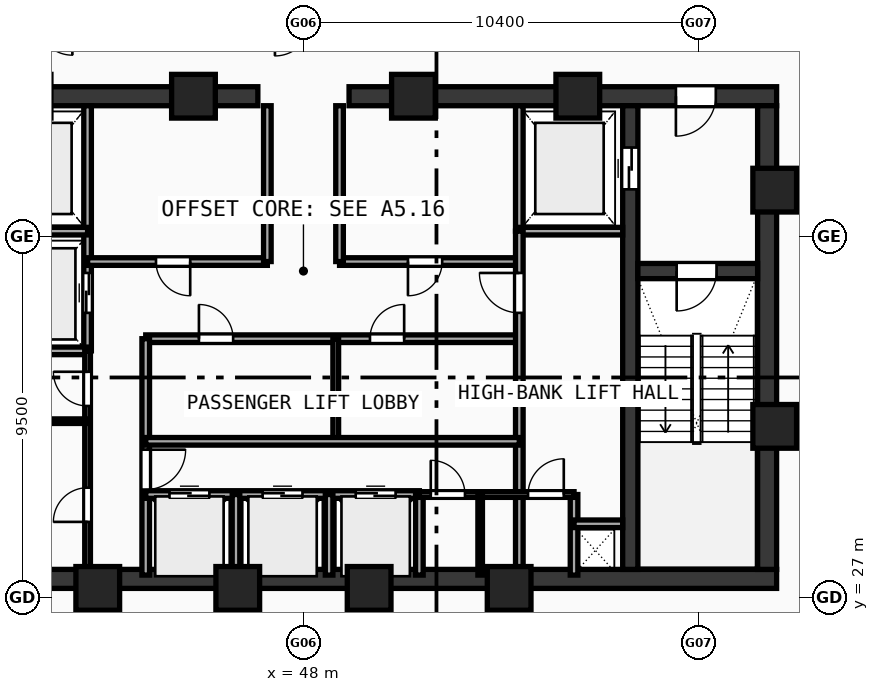
"""IFC4 building model, lengths in metres.
Left out: names, types, materials, properties, quantities, classifications, styles, units other than length and angle.
Written with IfcOpenShell. Run it as: python <this file> out.ifc"""

import sys

from ifc_helpers import new_model, si_unit, direction, frame, frame_2d, origin, origin_with_axes, origin_2d, place, context, subcontext, project, spatial, rectangle, hollow_rectangle, extrude, source, transform, mapped, element, fill, save


model = new_model("IFC4")
c1 = context("Model", 3, precision=1e-05, world=origin(), true_north=direction((0.0, 1.0)))
c2 = subcontext(c1, "Body", "Model", "MODEL_VIEW")
j1 = project(units=[si_unit("LENGTHUNIT", "METRE"), si_unit("PLANEANGLEUNIT", "RADIAN")], contexts=[c1])
p1 = place(None, origin())
s1 = spatial("IfcSite", under=j1, at=p1, CompositionType="ELEMENT")
p2 = place(p1, origin())
s2 = spatial("IfcBuilding", under=s1, at=p2, CompositionType="ELEMENT")
p3 = place(p2, frame((0.0, 0.0, 244.53)))
s3 = spatial("IfcBuildingStorey", under=s2, at=p3, CompositionType="ELEMENT", Elevation=244.53)
p4 = place(p3, frame((35.55, 27.5, 0.0), z_axis=(0.0, 0.0, 1.0), x_axis=(1.0, 0.0, 0.0)))
e1 = element("IfcWall", 1, at=p4, inside=s3, PredefinedType="SHEAR", context=c2, shape_type="SweptSolid", body=[
    extrude(rectangle(XDim=24.9, YDim=0.5, at=frame_2d((12.45, 0.0))), origin(), (0.0, 0.0, 1.0), 3.47),
])
p5 = place(p3, frame((35.55, 40.2, 0.0), z_axis=(0.0, 0.0, 1.0), x_axis=(1.0, 0.0, 0.0)))
e2 = element("IfcWall", 2, at=p5, inside=s3, PredefinedType="SHEAR", context=c2, shape_type="SweptSolid", body=[
    extrude(rectangle(XDim=11.25, YDim=0.5, at=frame_2d((5.625, 0.0))), origin(), (0.0, 0.0, 1.0), 3.47),
])
p6 = place(p5, frame((1.6, 0.0, 0.0)))
e3 = element("IfcOpeningElement", 3, at=p6, cuts=e2, PredefinedType="OPENING", context=c2, shape_type="SweptSolid", body=[
    extrude(rectangle(XDim=1.05, YDim=2.1, at=frame_2d((0.525, 1.05))), frame((0.0, 0.26, 0.0), z_axis=(0.0, -1.0, 0.0), x_axis=(1.0, 0.0, 0.0)), (0.0, 0.0, 1.0), 0.52),
])
p7 = place(p3, frame((49.2, 40.2, 0.0), z_axis=(0.0, 0.0, 1.0), x_axis=(1.0, 0.0, 0.0)))
e4 = element("IfcWall", 4, at=p7, inside=s3, PredefinedType="SHEAR", context=c2, shape_type="SweptSolid", body=[
    extrude(rectangle(XDim=11.25, YDim=0.5, at=frame_2d((5.625, 0.0))), origin(), (0.0, 0.0, 1.0), 3.47),
])
p8 = place(p7, frame((8.6, 0.0, 0.0)))
e5 = element("IfcOpeningElement", 5, at=p8, cuts=e4, PredefinedType="OPENING", context=c2, shape_type="SweptSolid", body=[
    extrude(rectangle(XDim=1.05, YDim=2.1, at=frame_2d((0.525, 1.05))), frame((0.0, 0.26, 0.0), z_axis=(0.0, -1.0, 0.0), x_axis=(1.0, 0.0, 0.0)), (0.0, 0.0, 1.0), 0.52),
])
p9 = place(p3, frame((60.2, 27.75, 0.0), z_axis=(0.0, 0.0, 1.0), x_axis=(0.0, 1.0, 0.0)))
e6 = element("IfcWall", 6, at=p9, inside=s3, PredefinedType="SHEAR", context=c2, shape_type="SweptSolid", body=[
    extrude(rectangle(XDim=12.2, YDim=0.5, at=frame_2d((6.1, 0.0))), origin(), (0.0, 0.0, 1.0), 3.47),
])
p10 = place(p3, frame((56.6, 27.75, 0.0), z_axis=(0.0, 0.0, 1.0), x_axis=(0.0, 1.0, 0.0)))
e7 = element("IfcWall", 7, at=p10, inside=s3, PredefinedType="SHEAR", context=c2, shape_type="SweptSolid", body=[
    extrude(rectangle(XDim=12.2, YDim=0.4, at=frame_2d((6.1, 0.0))), origin(), (0.0, 0.0, 1.0), 3.47),
])
p11 = place(p10, frame((10.0, 0.0, 0.0)))
e8 = element("IfcOpeningElement", 8, at=p11, cuts=e7, PredefinedType="OPENING", context=c2, shape_type="SweptSolid", body=[
    extrude(rectangle(XDim=1.1, YDim=2.1, at=frame_2d((0.55, 1.05))), frame((0.0, 0.21, 0.0), z_axis=(0.0, -1.0, 0.0), x_axis=(1.0, 0.0, 0.0)), (0.0, 0.0, 1.0), 0.42),
])
p12 = place(p3, frame((56.8, 35.6, 0.0), z_axis=(0.0, 0.0, 1.0), x_axis=(1.0, 0.0, 0.0)))
e9 = element("IfcWall", 9, at=p12, inside=s3, PredefinedType="SHEAR", context=c2, shape_type="SweptSolid", body=[
    extrude(rectangle(XDim=3.15, YDim=0.4, at=frame_2d((1.575, 0.0))), origin(), (0.0, 0.0, 1.0), 3.47),
])
p13 = place(p12, frame((1.02, 0.0, 0.0)))
e10 = element("IfcOpeningElement", 10, at=p13, cuts=e9, PredefinedType="OPENING", context=c2, shape_type="SweptSolid", body=[
    extrude(rectangle(XDim=1.05, YDim=2.1, at=frame_2d((0.525, 1.05))), frame((0.0, 0.21, 0.0), z_axis=(0.0, -1.0, 0.0), x_axis=(1.0, 0.0, 0.0)), (0.0, 0.0, 1.0), 0.42),
])
m1 = source(origin(), c2, "Body", "SweptSolid", [
    extrude(hollow_rectangle(XDim=1.15, YDim=1.15, WallThickness=0.048, at=origin_2d()), origin(), (0.0, 0.0, 1.0), 3.73),
])
for number, where, z_axis, x_axis in (
    (11, (42.588, 27.25, -0.26), (0.0, 0.0, 1.0), (1.0, 0.0, 0.0)),
    (12, (46.272, 27.25, -0.26), (0.0, 0.0, 1.0), (1.0, 0.0, 0.0)),
    (13, (49.729, 27.25, -0.26), (0.0, 0.0, 1.0), (1.0, 0.0, 0.0)),
    (14, (53.412, 27.25, -0.26), (0.0, 0.0, 1.0), (1.0, 0.0, 0.0)),
    (15, (60.4, 31.513, -0.26), (0.0, 0.0, 1.0), (1.0, 0.0, 0.0)),
    (16, (60.4, 37.729, -0.26), (0.0, 0.0, 1.0), (1.0, 0.0, 0.0)),
    (17, (55.219, 40.2, -0.26), (0.0, 0.0, 1.0), (1.0, 0.0, 0.0)),
    (18, (50.894, 40.2, -0.26), (0.0, 0.0, 1.0), (1.0, 0.0, 0.0)),
    (19, (45.106, 40.2, -0.26), (0.0, 0.0, 1.0), (1.0, 0.0, 0.0)),
):
    element("IfcColumn", number, at=place(p3, frame(where, z_axis=z_axis, x_axis=x_axis)), inside=s3, PredefinedType="COLUMN", context=c2, shape_type="MappedRepresentation", body=[
        mapped(m1, transform((0.0, 0.0, 0.0), scale=1.0)),
    ])
p14 = place(p3, frame((42.32, 33.5, 0.0), z_axis=(0.0, 0.0, 1.0), x_axis=(0.0, 1.0, 0.0)))
e20 = element("IfcWall", 20, at=p14, inside=s3, PredefinedType="SOLIDWALL", context=c2, shape_type="SweptSolid", body=[
    extrude(rectangle(XDim=6.45, YDim=0.2, at=frame_2d((3.225, 0.0))), origin(), (0.0, 0.0, 1.0), 3.47),
])
p15 = place(p14, frame((1.0, 0.0, 0.0)))
e21 = element("IfcOpeningElement", 21, at=p15, cuts=e20, PredefinedType="OPENING", context=c2, shape_type="SweptSolid", body=[
    extrude(rectangle(XDim=1.05, YDim=2.1, at=frame_2d((0.525, 1.05))), frame((0.0, 0.11, 0.0), z_axis=(0.0, -1.0, 0.0), x_axis=(1.0, 0.0, 0.0)), (0.0, 0.0, 1.0), 0.22),
])
for number, where, z_axis, x_axis in (
    (22, (39.6, 36.65, 0.0), (0.0, 0.0, 1.0), (1.0, 0.0, 0.0)),
    (23, (39.6, 33.5, 0.0), (0.0, 0.0, 1.0), (1.0, 0.0, 0.0)),
):
    element("IfcWall", number, at=place(p3, frame(where, z_axis=z_axis, x_axis=x_axis)), inside=s3, PredefinedType="SOLIDWALL", context=c2, shape_type="SweptSolid", body=[
        extrude(rectangle(XDim=2.72, YDim=0.2, at=frame_2d((1.36, 0.0))), origin(), (0.0, 0.0, 1.0), 3.47),
    ])
p16 = place(p3, frame((53.68, 36.65, 0.0), z_axis=(0.0, 0.0, 1.0), x_axis=(0.0, 1.0, 0.0)))
e24 = element("IfcWall", 24, at=p16, inside=s3, PredefinedType="SOLIDWALL", context=c2, shape_type="SweptSolid", body=[
    extrude(rectangle(XDim=3.3, YDim=0.2, at=frame_2d((1.65, 0.0))), origin(), (0.0, 0.0, 1.0), 3.47),
])
p17 = place(p3, frame((53.68, 36.65, 0.0), z_axis=(0.0, 0.0, 1.0), x_axis=(1.0, 0.0, 0.0)))
e25 = element("IfcWall", 25, at=p17, inside=s3, PredefinedType="SOLIDWALL", context=c2, shape_type="SweptSolid", body=[
    extrude(rectangle(XDim=2.72, YDim=0.2, at=frame_2d((1.36, 0.0))), origin(), (0.0, 0.0, 1.0), 3.47),
])
p18 = place(p3, frame((42.32, 35.85, 0.0), z_axis=(0.0, 0.0, 1.0), x_axis=(1.0, 0.0, 0.0)))
e26 = element("IfcWall", 26, at=p18, inside=s3, PredefinedType="SOLIDWALL", context=c2, shape_type="SweptSolid", body=[
    extrude(rectangle(XDim=4.73, YDim=0.2, at=frame_2d((2.365, 0.0))), origin(), (0.0, 0.0, 1.0), 3.47),
])
p19 = place(p18, frame((1.8, 0.0, 0.0)))
e27 = element("IfcOpeningElement", 27, at=p19, cuts=e26, PredefinedType="OPENING", context=c2, shape_type="SweptSolid", body=[
    extrude(rectangle(XDim=0.9, YDim=2.1, at=frame_2d((0.45, 1.05))), frame((0.0, 0.11, 0.0), z_axis=(0.0, -1.0, 0.0), x_axis=(1.0, 0.0, 0.0)), (0.0, 0.0, 1.0), 0.22),
])
p20 = place(p3, frame((48.95, 35.85, 0.0), z_axis=(0.0, 0.0, 1.0), x_axis=(1.0, 0.0, 0.0)))
e28 = element("IfcWall", 28, at=p20, inside=s3, PredefinedType="SOLIDWALL", context=c2, shape_type="SweptSolid", body=[
    extrude(rectangle(XDim=4.73, YDim=0.2, at=frame_2d((2.365, 0.0))), origin(), (0.0, 0.0, 1.0), 3.47),
])
p21 = place(p20, frame((1.8, 0.0, 0.0)))
e29 = element("IfcOpeningElement", 29, at=p21, cuts=e28, PredefinedType="OPENING", context=c2, shape_type="SweptSolid", body=[
    extrude(rectangle(XDim=0.9, YDim=2.1, at=frame_2d((0.45, 1.05))), frame((0.0, 0.11, 0.0), z_axis=(0.0, -1.0, 0.0), x_axis=(1.0, 0.0, 0.0)), (0.0, 0.0, 1.0), 0.22),
])
for number, where, z_axis, x_axis in (
    (30, (47.05, 35.85, 0.0), (0.0, 0.0, 1.0), (0.0, 1.0, 0.0)),
    (31, (48.95, 35.85, 0.0), (0.0, 0.0, 1.0), (0.0, 1.0, 0.0)),
):
    element("IfcWall", number, at=place(p3, frame(where, z_axis=z_axis, x_axis=x_axis)), inside=s3, PredefinedType="SOLIDWALL", context=c2, shape_type="SweptSolid", body=[
        extrude(rectangle(XDim=4.1, YDim=0.2, at=frame_2d((2.05, 0.0))), origin(), (0.0, 0.0, 1.0), 3.47),
    ])
p22 = place(p3, frame((43.85, 33.82, 0.0), z_axis=(0.0, 0.0, 1.0), x_axis=(1.0, 0.0, 0.0)))
e32 = element("IfcWall", 32, at=p22, inside=s3, PredefinedType="SOLIDWALL", context=c2, shape_type="SweptSolid", body=[
    extrude(rectangle(XDim=9.83, YDim=0.2, at=frame_2d((4.915, 0.0))), origin(), (0.0, 0.0, 1.0), 3.47),
])
p23 = place(p22, frame((1.4, 0.0, 0.0)))
e33 = element("IfcOpeningElement", 33, at=p23, cuts=e32, PredefinedType="OPENING", context=c2, shape_type="SweptSolid", body=[
    extrude(rectangle(XDim=0.9, YDim=2.1, at=frame_2d((0.45, 1.05))), frame((0.0, 0.11, 0.0), z_axis=(0.0, -1.0, 0.0), x_axis=(1.0, 0.0, 0.0)), (0.0, 0.0, 1.0), 0.22),
])
p24 = place(p22, frame((5.9, 0.0, 0.0)))
e34 = element("IfcOpeningElement", 34, at=p24, cuts=e32, PredefinedType="OPENING", context=c2, shape_type="SweptSolid", body=[
    extrude(rectangle(XDim=0.9, YDim=2.1, at=frame_2d((0.45, 1.05))), frame((0.0, 0.11, 0.0), z_axis=(0.0, -1.0, 0.0), x_axis=(1.0, 0.0, 0.0)), (0.0, 0.0, 1.0), 0.22),
])
p25 = place(p3, frame((43.85, 27.6, 0.0), z_axis=(0.0, 0.0, 1.0), x_axis=(0.0, 1.0, 0.0)))
e35 = element("IfcWall", 35, at=p25, inside=s3, PredefinedType="SOLIDWALL", context=c2, shape_type="SweptSolid", body=[
    extrude(rectangle(XDim=6.22, YDim=0.2, at=frame_2d((3.11, 0.0))), origin(), (0.0, 0.0, 1.0), 3.47),
])
p26 = place(p25, frame((2.25, 0.0, 0.0)))
e36 = element("IfcOpeningElement", 36, at=p26, cuts=e35, PredefinedType="OPENING", context=c2, shape_type="SweptSolid", body=[
    extrude(rectangle(XDim=1.05, YDim=2.1, at=frame_2d((0.525, 1.05))), frame((0.0, 0.11, 0.0), z_axis=(0.0, -1.0, 0.0), x_axis=(1.0, 0.0, 0.0)), (0.0, 0.0, 1.0), 0.22),
])
p27 = place(p3, frame((53.68, 27.6, 0.0), z_axis=(0.0, 0.0, 1.0), x_axis=(0.0, 1.0, 0.0)))
e37 = element("IfcWall", 37, at=p27, inside=s3, PredefinedType="SOLIDWALL", context=c2, shape_type="SweptSolid", body=[
    extrude(rectangle(XDim=9.05, YDim=0.2, at=frame_2d((4.525, 0.0))), origin(), (0.0, 0.0, 1.0), 3.47),
])
p28 = place(p27, frame((6.9, 0.0, 0.0)))
e38 = element("IfcOpeningElement", 38, at=p28, cuts=e37, PredefinedType="OPENING", context=c2, shape_type="SweptSolid", body=[
    extrude(rectangle(XDim=1.05, YDim=2.1, at=frame_2d((0.525, 1.05))), frame((0.0, 0.11, 0.0), z_axis=(0.0, -1.0, 0.0), x_axis=(1.0, 0.0, 0.0)), (0.0, 0.0, 1.0), 0.22),
])
p29 = place(p3, frame((48.85, 31.12, 0.0), z_axis=(0.0, 0.0, 1.0), x_axis=(0.0, 1.0, 0.0)))
e39 = element("IfcWall", 39, at=p29, inside=s3, PredefinedType="PARTITIONING", context=c2, shape_type="SweptSolid", body=[
    extrude(rectangle(XDim=2.7, YDim=0.15, at=frame_2d((1.35, 0.0))), origin(), (0.0, 0.0, 1.0), 3.47),
])
p30 = place(p3, frame((43.85, 29.72, 0.0), z_axis=(0.0, 0.0, 1.0), x_axis=(1.0, 0.0, 0.0)))
e40 = element("IfcWall", 40, at=p30, inside=s3, PredefinedType="SOLIDWALL", context=c2, shape_type="SweptSolid", body=[
    extrude(rectangle(XDim=7.2, YDim=0.2, at=frame_2d((3.6, 0.0))), origin(), (0.0, 0.0, 1.0), 3.47),
])
p31 = place(p30, frame((0.625, 0.0, 0.0)))
e41 = element("IfcOpeningElement", 41, at=p31, cuts=e40, PredefinedType="OPENING", context=c2, shape_type="SweptSolid", body=[
    extrude(rectangle(XDim=1.05, YDim=2.1, at=frame_2d((0.525, 1.05))), frame((0.0, 0.11, 0.0), z_axis=(0.0, -1.0, 0.0), x_axis=(1.0, 0.0, 0.0)), (0.0, 0.0, 1.0), 0.22),
])
p32 = place(p30, frame((3.075, 0.0, 0.0)))
e42 = element("IfcOpeningElement", 42, at=p32, cuts=e40, PredefinedType="OPENING", context=c2, shape_type="SweptSolid", body=[
    extrude(rectangle(XDim=1.05, YDim=2.1, at=frame_2d((0.525, 1.05))), frame((0.0, 0.11, 0.0), z_axis=(0.0, -1.0, 0.0), x_axis=(1.0, 0.0, 0.0)), (0.0, 0.0, 1.0), 0.22),
])
p33 = place(p30, frame((5.525, 0.0, 0.0)))
e43 = element("IfcOpeningElement", 43, at=p33, cuts=e40, PredefinedType="OPENING", context=c2, shape_type="SweptSolid", body=[
    extrude(rectangle(XDim=1.05, YDim=2.1, at=frame_2d((0.525, 1.05))), frame((0.0, 0.11, 0.0), z_axis=(0.0, -1.0, 0.0), x_axis=(1.0, 0.0, 0.0)), (0.0, 0.0, 1.0), 0.22),
])
p34 = place(p3, frame((51.05, 27.6, 0.0), z_axis=(0.0, 0.0, 1.0), x_axis=(0.0, 1.0, 0.0)))
e44 = element("IfcWall", 44, at=p34, inside=s3, PredefinedType="SOLIDWALL", context=c2, shape_type="SweptSolid", body=[
    extrude(rectangle(XDim=2.12, YDim=0.2, at=frame_2d((1.06, 0.0))), origin(), (0.0, 0.0, 1.0), 3.47),
])
p35 = place(p3, frame((43.85, 31.12, 0.0), z_axis=(0.0, 0.0, 1.0), x_axis=(1.0, 0.0, 0.0)))
e45 = element("IfcWall", 45, at=p35, inside=s3, PredefinedType="SOLIDWALL", context=c2, shape_type="SweptSolid", body=[
    extrude(rectangle(XDim=9.83, YDim=0.2, at=frame_2d((4.915, 0.0))), origin(), (0.0, 0.0, 1.0), 3.47),
])
for number, where, z_axis, x_axis in (
    (46, (46.225, 27.6, 0.0), (0.0, 0.0, 1.0), (0.0, 1.0, 0.0)),
    (47, (48.675, 27.6, 0.0), (0.0, 0.0, 1.0), (0.0, 1.0, 0.0)),
    (48, (55.12, 27.6, 0.0), (0.0, 0.0, 1.0), (0.0, 1.0, 0.0)),
):
    element("IfcWall", number, at=place(p3, frame(where, z_axis=z_axis, x_axis=x_axis)), inside=s3, PredefinedType="SOLIDWALL", context=c2, shape_type="SweptSolid", body=[
        extrude(rectangle(XDim=2.12, YDim=0.2, at=frame_2d((1.06, 0.0))), origin(), (0.0, 0.0, 1.0), 3.47),
    ])
p36 = place(p3, frame((55.12, 28.95, 0.0), z_axis=(0.0, 0.0, 1.0), x_axis=(1.0, 0.0, 0.0)))
e49 = element("IfcWall", 49, at=p36, inside=s3, PredefinedType="SOLIDWALL", context=c2, shape_type="SweptSolid", body=[
    extrude(rectangle(XDim=1.28, YDim=0.2, at=frame_2d((0.64, 0.0))), origin(), (0.0, 0.0, 1.0), 3.47),
])
p37 = place(p3, frame((42.32, 27.6, 0.0), z_axis=(0.0, 0.0, 1.0), x_axis=(0.0, 1.0, 0.0)))
e50 = element("IfcWall", 50, at=p37, inside=s3, PredefinedType="PARTITIONING", context=c2, shape_type="SweptSolid", body=[
    extrude(rectangle(XDim=5.9, YDim=0.15, at=frame_2d((2.95, 0.0))), origin(), (0.0, 0.0, 1.0), 3.47),
])
p38 = place(p37, frame((1.4, 0.0, 0.0)))
e51 = element("IfcOpeningElement", 51, at=p38, cuts=e50, PredefinedType="OPENING", context=c2, shape_type="SweptSolid", body=[
    extrude(rectangle(XDim=0.9, YDim=2.1, at=frame_2d((0.45, 1.05))), frame((0.0, 0.085, 0.0), z_axis=(0.0, -1.0, 0.0), x_axis=(1.0, 0.0, 0.0)), (0.0, 0.0, 1.0), 0.17),
])
p39 = place(p37, frame((4.45, 0.0, 0.0)))
e52 = element("IfcOpeningElement", 52, at=p39, cuts=e50, PredefinedType="OPENING", context=c2, shape_type="SweptSolid", body=[
    extrude(rectangle(XDim=0.9, YDim=2.1, at=frame_2d((0.45, 1.05))), frame((0.0, 0.085, 0.0), z_axis=(0.0, -1.0, 0.0), x_axis=(1.0, 0.0, 0.0)), (0.0, 0.0, 1.0), 0.17),
])
p40 = place(p3, frame((51.05, 29.72, 0.0), z_axis=(0.0, 0.0, 1.0), x_axis=(1.0, 0.0, 0.0)))
e53 = element("IfcWall", 53, at=p40, inside=s3, PredefinedType="PARTITIONING", context=c2, shape_type="SweptSolid", body=[
    extrude(rectangle(XDim=4.07, YDim=0.15, at=frame_2d((2.035, 0.0))), origin(), (0.0, 0.0, 1.0), 3.47),
])
p41 = place(p40, frame((0.3, 0.0, 0.0)))
e54 = element("IfcOpeningElement", 54, at=p41, cuts=e53, PredefinedType="OPENING", context=c2, shape_type="SweptSolid", body=[
    extrude(rectangle(XDim=0.9, YDim=2.1, at=frame_2d((0.45, 1.05))), frame((0.0, 0.085, 0.0), z_axis=(0.0, -1.0, 0.0), x_axis=(1.0, 0.0, 0.0)), (0.0, 0.0, 1.0), 0.17),
])
p42 = place(p40, frame((2.86, 0.0, 0.0)))
e55 = element("IfcOpeningElement", 55, at=p42, cuts=e53, PredefinedType="OPENING", context=c2, shape_type="SweptSolid", body=[
    extrude(rectangle(XDim=0.94, YDim=2.1, at=frame_2d((0.47, 1.05))), frame((0.0, 0.085, 0.0), z_axis=(0.0, -1.0, 0.0), x_axis=(1.0, 0.0, 0.0)), (0.0, 0.0, 1.0), 0.17),
])
p43 = place(p3, frame((39.6, 31.65, 0.0), z_axis=(0.0, 0.0, 1.0), x_axis=(1.0, 0.0, 0.0)))
e56 = element("IfcWall", 56, at=p43, inside=s3, PredefinedType="PARTITIONING", context=c2, shape_type="SweptSolid", body=[
    extrude(rectangle(XDim=2.72, YDim=0.12, at=frame_2d((1.36, 0.0))), origin(), (0.0, 0.0, 1.0), 3.47),
])
p44 = place(p3, frame((52.65, 27.6, 0.0), z_axis=(0.0, 0.0, 1.0), x_axis=(0.0, 1.0, 0.0)))
e57 = element("IfcWall", 57, at=p44, inside=s3, PredefinedType="PARTITIONING", context=c2, shape_type="SweptSolid", body=[
    extrude(rectangle(XDim=2.12, YDim=0.12, at=frame_2d((1.06, 0.0))), origin(), (0.0, 0.0, 1.0), 3.47),
])
m2 = source(origin(), c2, "Body", "SweptSolid", [
    extrude(rectangle(XDim=1.05, YDim=2.1, at=frame_2d((0.525, 1.05))), frame((0.0, 0.025, 0.0), z_axis=(0.0, -1.0, 0.0), x_axis=(1.0, 0.0, 0.0)), (0.0, 0.0, 1.0), 0.05),
])
p45 = place(p13, frame((1.05, 0.0, 0.0), z_axis=(0.0, 0.0, 1.0), x_axis=(-1.0, 0.0, 0.0)))
e58 = element("IfcDoor", 58, at=p45, inside=s3, OperationType="SINGLE_SWING_RIGHT", PredefinedType="DOOR", context=c2, shape_type="MappedRepresentation", body=[
    mapped(m2, transform((0.0, 0.0, 0.0), scale=1.0)),
])
fill(e10, e58)
p46 = place(p8, frame((1.05, 0.0, 0.0), z_axis=(0.0, 0.0, 1.0), x_axis=(-1.0, 0.0, 0.0)))
e59 = element("IfcDoor", 59, at=p46, inside=s3, OperationType="SINGLE_SWING_RIGHT", PredefinedType="DOOR", context=c2, shape_type="MappedRepresentation", body=[
    mapped(m2, transform((0.0, 0.0, 0.0), scale=1.0)),
])
fill(e5, e59)
m3 = source(origin(), c2, "Body", "SweptSolid", [
    extrude(rectangle(XDim=1.1, YDim=2.1, at=frame_2d((0.55, 1.05))), frame((0.0, 0.025, 0.0), z_axis=(0.0, -1.0, 0.0), x_axis=(1.0, 0.0, 0.0)), (0.0, 0.0, 1.0), 0.05),
])
p47 = place(p11, origin_with_axes())
e60 = element("IfcDoor", 60, at=p47, inside=s3, OperationType="DOUBLE_DOOR_SLIDING", PredefinedType="DOOR", context=c2, shape_type="MappedRepresentation", body=[
    mapped(m3, transform((0.0, 0.0, 0.0), scale=1.0)),
])
fill(e8, e60)
p48 = place(p15, origin_with_axes())
e61 = element("IfcDoor", 61, at=p48, inside=s3, OperationType="DOUBLE_DOOR_SLIDING", PredefinedType="DOOR", context=c2, shape_type="MappedRepresentation", body=[
    mapped(m2, transform((0.0, 0.0, 0.0), scale=1.0)),
])
fill(e21, e61)
m4 = source(origin(), c2, "Body", "SweptSolid", [
    extrude(rectangle(XDim=0.9, YDim=2.1, at=frame_2d((0.45, 1.05))), frame((0.0, 0.025, 0.0), z_axis=(0.0, -1.0, 0.0), x_axis=(1.0, 0.0, 0.0)), (0.0, 0.0, 1.0), 0.05),
])
p49 = place(p19, frame((0.9, 0.0, 0.0), z_axis=(0.0, 0.0, 1.0), x_axis=(-1.0, 0.0, 0.0)))
e62 = element("IfcDoor", 62, at=p49, inside=s3, OperationType="SINGLE_SWING_LEFT", PredefinedType="DOOR", context=c2, shape_type="MappedRepresentation", body=[
    mapped(m4, transform((0.0, 0.0, 0.0), scale=1.0)),
])
fill(e27, e62)
p50 = place(p21, frame((0.9, 0.0, 0.0), z_axis=(0.0, 0.0, 1.0), x_axis=(-1.0, 0.0, 0.0)))
e63 = element("IfcDoor", 63, at=p50, inside=s3, OperationType="SINGLE_SWING_RIGHT", PredefinedType="DOOR", context=c2, shape_type="MappedRepresentation", body=[
    mapped(m4, transform((0.0, 0.0, 0.0), scale=1.0)),
])
fill(e29, e63)
p51 = place(p23, origin_with_axes())
e64 = element("IfcDoor", 64, at=p51, inside=s3, OperationType="SINGLE_SWING_LEFT", PredefinedType="DOOR", context=c2, shape_type="MappedRepresentation", body=[
    mapped(m4, transform((0.0, 0.0, 0.0), scale=1.0)),
])
fill(e33, e64)
p52 = place(p24, origin_with_axes())
e65 = element("IfcDoor", 65, at=p52, inside=s3, OperationType="SINGLE_SWING_RIGHT", PredefinedType="DOOR", context=c2, shape_type="MappedRepresentation", body=[
    mapped(m4, transform((0.0, 0.0, 0.0), scale=1.0)),
])
fill(e34, e65)
p53 = place(p26, frame((1.05, 0.0, 0.0), z_axis=(0.0, 0.0, 1.0), x_axis=(-1.0, 0.0, 0.0)))
e66 = element("IfcDoor", 66, at=p53, inside=s3, OperationType="SINGLE_SWING_LEFT", PredefinedType="DOOR", context=c2, shape_type="MappedRepresentation", body=[
    mapped(m2, transform((0.0, 0.0, 0.0), scale=1.0)),
])
fill(e36, e66)
p54 = place(p28, origin_with_axes())
e67 = element("IfcDoor", 67, at=p54, inside=s3, OperationType="SINGLE_SWING_RIGHT", PredefinedType="DOOR", context=c2, shape_type="MappedRepresentation", body=[
    mapped(m2, transform((0.0, 0.0, 0.0), scale=1.0)),
])
fill(e38, e67)
p55 = place(p31, origin_with_axes())
e68 = element("IfcDoor", 68, at=p55, inside=s3, OperationType="DOUBLE_DOOR_SLIDING", PredefinedType="DOOR", context=c2, shape_type="MappedRepresentation", body=[
    mapped(m2, transform((0.0, 0.0, 0.0), scale=1.0)),
])
fill(e41, e68)
p56 = place(p32, origin_with_axes())
e69 = element("IfcDoor", 69, at=p56, inside=s3, OperationType="DOUBLE_DOOR_SLIDING", PredefinedType="DOOR", context=c2, shape_type="MappedRepresentation", body=[
    mapped(m2, transform((0.0, 0.0, 0.0), scale=1.0)),
])
fill(e42, e69)
p57 = place(p33, origin_with_axes())
e70 = element("IfcDoor", 70, at=p57, inside=s3, OperationType="DOUBLE_DOOR_SLIDING", PredefinedType="DOOR", context=c2, shape_type="MappedRepresentation", body=[
    mapped(m2, transform((0.0, 0.0, 0.0), scale=1.0)),
])
fill(e43, e70)
p58 = place(p38, origin_with_axes())
e71 = element("IfcDoor", 71, at=p58, inside=s3, OperationType="SINGLE_SWING_LEFT", PredefinedType="DOOR", context=c2, shape_type="MappedRepresentation", body=[
    mapped(m4, transform((0.0, 0.0, 0.0), scale=1.0)),
])
fill(e51, e71)
p59 = place(p39, origin_with_axes())
e72 = element("IfcDoor", 72, at=p59, inside=s3, OperationType="SINGLE_SWING_RIGHT", PredefinedType="DOOR", context=c2, shape_type="MappedRepresentation", body=[
    mapped(m4, transform((0.0, 0.0, 0.0), scale=1.0)),
])
fill(e52, e72)
p60 = place(p41, origin_with_axes())
e73 = element("IfcDoor", 73, at=p60, inside=s3, OperationType="SINGLE_SWING_LEFT", PredefinedType="DOOR", context=c2, shape_type="MappedRepresentation", body=[
    mapped(m4, transform((0.0, 0.0, 0.0), scale=1.0)),
])
fill(e54, e73)
m5 = source(origin(), c2, "Body", "SweptSolid", [
    extrude(rectangle(XDim=0.94, YDim=2.1, at=frame_2d((0.47, 1.05))), frame((0.0, 0.025, 0.0), z_axis=(0.0, -1.0, 0.0), x_axis=(1.0, 0.0, 0.0)), (0.0, 0.0, 1.0), 0.05),
])
p61 = place(p42, origin_with_axes())
e74 = element("IfcDoor", 74, at=p61, inside=s3, OperationType="SINGLE_SWING_RIGHT", PredefinedType="DOOR", context=c2, shape_type="MappedRepresentation", body=[
    mapped(m5, transform((0.0, 0.0, 0.0), scale=1.0)),
])
fill(e55, e74)
save(model, sys.argv[1])
